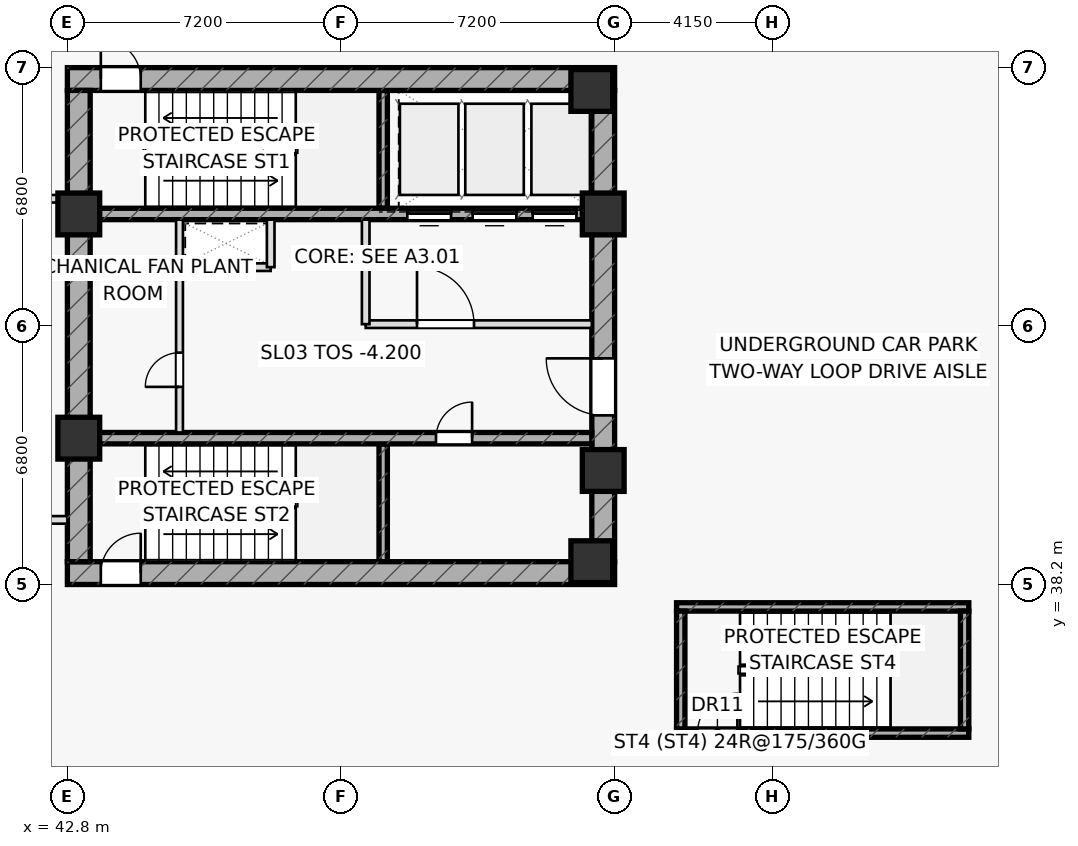
"""IFC4 building model, lengths in metres.
Left out: names, types, materials, properties, quantities, classifications, styles, units other than length and angle.
Written with IfcOpenShell. Run it as: python <this file> out.ifc"""

import sys

from ifc_helpers import new_model, si_unit, direction, frame, frame_2d, origin, origin_2d, place, context, subcontext, project, spatial, rectangle, extrude, element, fill, save


model = new_model("IFC4")
c1 = context("Model", 3, precision=1e-05, world=origin(), true_north=direction((0.0, 1.0)))
c2 = subcontext(c1, "Body", "Model", "MODEL_VIEW")
j1 = project(units=[si_unit("LENGTHUNIT", "METRE"), si_unit("PLANEANGLEUNIT", "RADIAN")], contexts=[c1])
p1 = place(None, origin())
s1 = spatial("IfcSite", under=j1, at=p1, CompositionType="ELEMENT")
p2 = place(p1, origin())
s2 = spatial("IfcBuilding", under=s1, at=p2, CompositionType="ELEMENT")
p3 = place(p2, frame((0.0, 0.0, -4.2)))
s3 = spatial("IfcBuildingStorey", under=s2, at=p3, CompositionType="ELEMENT", Elevation=-4.2)
for number, where, z_axis, x_axis in (
    (1, (51.11, 48.1, 0.0), (0.0, 0.0, 1.0), (0.0, 1.0, 0.0)),
    (2, (51.11, 38.8, 0.0), (0.0, 0.0, 1.0), (0.0, 1.0, 0.0)),
):
    element("IfcWall", number, at=place(p3, frame(where, z_axis=z_axis, x_axis=x_axis)), inside=s3, PredefinedType="SHEAR", context=c2, shape_type="SweptSolid", body=[
        extrude(rectangle(XDim=3.1, YDim=0.22, at=frame_2d((1.55, 0.0))), origin(), (0.0, 0.0, 1.0), 3.85),
    ])
p4 = place(p3, frame((58.83, 34.29, 0.0), z_axis=(0.0, 0.0, 1.0), x_axis=(1.0, 0.0, 0.0)))
e3 = element("IfcWall", 3, at=p4, inside=s3, PredefinedType="SHEAR", context=c2, shape_type="SweptSolid", body=[
    extrude(rectangle(XDim=7.69, YDim=0.22, at=frame_2d((3.845, 0.0))), origin(), (0.0, 0.0, 1.0), 3.85),
])
p5 = place(p4, frame((0.55, 0.0, 0.0)))
e4 = element("IfcOpeningElement", 4, at=p5, cuts=e3, PredefinedType="OPENING", context=c2, shape_type="SweptSolid", body=[
    extrude(rectangle(XDim=1.05, YDim=2.2, at=frame_2d((0.525, 1.1))), frame((0.0, 0.12, 0.0), z_axis=(0.0, -1.0, 0.0), x_axis=(1.0, 0.0, 0.0)), (0.0, 0.0, 1.0), 0.24),
])
p6 = place(p3, frame((58.83, 37.61, 0.0), z_axis=(0.0, 0.0, 1.0), x_axis=(1.0, 0.0, 0.0)))
e5 = element("IfcWall", 5, at=p6, inside=s3, PredefinedType="SHEAR", context=c2, shape_type="SweptSolid", body=[
    extrude(rectangle(XDim=7.69, YDim=0.22, at=frame_2d((3.845, 0.0))), origin(), (0.0, 0.0, 1.0), 3.85),
])
for number, where, z_axis, x_axis in (
    (6, (66.41, 34.4, 0.0), (0.0, 0.0, 1.0), (0.0, 1.0, 0.0)),
    (7, (58.94, 34.4, 0.0), (0.0, 0.0, 1.0), (0.0, 1.0, 0.0)),
):
    element("IfcWall", number, at=place(p3, frame(where, z_axis=z_axis, x_axis=x_axis)), inside=s3, PredefinedType="SHEAR", context=c2, shape_type="SweptSolid", body=[
        extrude(rectangle(XDim=3.1, YDim=0.22, at=frame_2d((1.55, 0.0))), origin(), (0.0, 0.0, 1.0), 3.85),
    ])
p7 = place(p3, frame((42.8, 51.5, 0.0), z_axis=(0.0, 0.0, 1.0), x_axis=(1.0, 0.0, 0.0)))
e8 = element("IfcWall", 8, at=p7, inside=s3, PredefinedType="SHEAR", context=c2, shape_type="SweptSolid", body=[
    extrude(rectangle(XDim=14.4, YDim=0.6, at=frame_2d((7.2, 0.0))), origin(), (0.0, 0.0, 1.0), 3.85),
])
p8 = place(p7, frame((0.88, 0.0, 0.0)))
e9 = element("IfcOpeningElement", 9, at=p8, cuts=e8, PredefinedType="OPENING", context=c2, shape_type="SweptSolid", body=[
    extrude(rectangle(XDim=1.05, YDim=2.2, at=frame_2d((0.525, 1.1))), frame((0.0, 0.31, 0.0), z_axis=(0.0, -1.0, 0.0), x_axis=(1.0, 0.0, 0.0)), (0.0, 0.0, 1.0), 0.62),
])
p9 = place(p3, frame((42.8, 38.5, 0.0), z_axis=(0.0, 0.0, 1.0), x_axis=(1.0, 0.0, 0.0)))
e10 = element("IfcWall", 10, at=p9, inside=s3, PredefinedType="SHEAR", context=c2, shape_type="SweptSolid", body=[
    extrude(rectangle(XDim=14.4, YDim=0.6, at=frame_2d((7.2, 0.0))), origin(), (0.0, 0.0, 1.0), 3.85),
])
p10 = place(p9, frame((0.88, 0.0, 0.0)))
e11 = element("IfcOpeningElement", 11, at=p10, cuts=e10, PredefinedType="OPENING", context=c2, shape_type="SweptSolid", body=[
    extrude(rectangle(XDim=1.05, YDim=2.2, at=frame_2d((0.525, 1.1))), frame((0.0, 0.31, 0.0), z_axis=(0.0, -1.0, 0.0), x_axis=(1.0, 0.0, 0.0)), (0.0, 0.0, 1.0), 0.62),
])
p11 = place(p3, frame((43.1, 38.8, 0.0), z_axis=(0.0, 0.0, 1.0), x_axis=(0.0, 1.0, 0.0)))
e12 = element("IfcWall", 12, at=p11, inside=s3, PredefinedType="SHEAR", context=c2, shape_type="SweptSolid", body=[
    extrude(rectangle(XDim=12.4, YDim=0.6, at=frame_2d((6.2, 0.0))), origin(), (0.0, 0.0, 1.0), 3.85),
])
p12 = place(p3, frame((56.9, 38.8, 0.0), z_axis=(0.0, 0.0, 1.0), x_axis=(0.0, 1.0, 0.0)))
e13 = element("IfcWall", 13, at=p12, inside=s3, PredefinedType="SHEAR", context=c2, shape_type="SweptSolid", body=[
    extrude(rectangle(XDim=12.4, YDim=0.6, at=frame_2d((6.2, 0.0))), origin(), (0.0, 0.0, 1.0), 3.85),
])
p13 = place(p12, frame((3.85, 0.0, 0.0)))
e14 = element("IfcOpeningElement", 14, at=p13, cuts=e13, PredefinedType="OPENING", context=c2, shape_type="SweptSolid", body=[
    extrude(rectangle(XDim=1.5, YDim=2.2, at=frame_2d((0.75, 1.1))), frame((0.0, 0.31, 0.0), z_axis=(0.0, -1.0, 0.0), x_axis=(1.0, 0.0, 0.0)), (0.0, 0.0, 1.0), 0.62),
])
p14 = place(p3, frame((43.4, 47.95, 0.0), z_axis=(0.0, 0.0, 1.0), x_axis=(1.0, 0.0, 0.0)))
e15 = element("IfcWall", 15, at=p14, inside=s3, PredefinedType="SHEAR", context=c2, shape_type="SweptSolid", body=[
    extrude(rectangle(XDim=13.2, YDim=0.3, at=frame_2d((6.6, 0.0))), origin(), (0.0, 0.0, 1.0), 3.85),
])
p15 = place(p14, frame((8.345, 0.0, 0.0)))
e16 = element("IfcOpeningElement", 16, at=p15, cuts=e15, PredefinedType="OPENING", context=c2, shape_type="SweptSolid", body=[
    extrude(rectangle(XDim=1.15, YDim=2.2, at=frame_2d((0.575, 1.1))), frame((0.0, 0.16, 0.0), z_axis=(0.0, -1.0, 0.0), x_axis=(1.0, 0.0, 0.0)), (0.0, 0.0, 1.0), 0.32),
])
p16 = place(p14, frame((10.065, 0.0, 0.0)))
e17 = element("IfcOpeningElement", 17, at=p16, cuts=e15, PredefinedType="OPENING", context=c2, shape_type="SweptSolid", body=[
    extrude(rectangle(XDim=1.15, YDim=2.2, at=frame_2d((0.575, 1.1))), frame((0.0, 0.16, 0.0), z_axis=(0.0, -1.0, 0.0), x_axis=(1.0, 0.0, 0.0)), (0.0, 0.0, 1.0), 0.32),
])
p17 = place(p14, frame((11.645, 0.0, 0.0)))
e18 = element("IfcOpeningElement", 18, at=p17, cuts=e15, PredefinedType="OPENING", context=c2, shape_type="SweptSolid", body=[
    extrude(rectangle(XDim=1.15, YDim=2.2, at=frame_2d((0.575, 1.1))), frame((0.0, 0.16, 0.0), z_axis=(0.0, -1.0, 0.0), x_axis=(1.0, 0.0, 0.0)), (0.0, 0.0, 1.0), 0.32),
])
p18 = place(p3, frame((43.4, 42.05, 0.0), z_axis=(0.0, 0.0, 1.0), x_axis=(1.0, 0.0, 0.0)))
e19 = element("IfcWall", 19, at=p18, inside=s3, PredefinedType="SHEAR", context=c2, shape_type="SweptSolid", body=[
    extrude(rectangle(XDim=13.2, YDim=0.3, at=frame_2d((6.6, 0.0))), origin(), (0.0, 0.0, 1.0), 3.85),
])
p19 = place(p18, frame((9.1, 0.0, 0.0)))
e20 = element("IfcOpeningElement", 20, at=p19, cuts=e19, PredefinedType="OPENING", context=c2, shape_type="SweptSolid", body=[
    extrude(rectangle(XDim=0.95, YDim=2.05, at=frame_2d((0.475, 1.025))), frame((0.0, 0.16, 0.0), z_axis=(0.0, -1.0, 0.0), x_axis=(1.0, 0.0, 0.0)), (0.0, 0.0, 1.0), 0.32),
])
for number, where, z_axis, x_axis in (
    (21, (43.1, 47.95, 0.0), (0.0, 0.0, 1.0), (1.0, 0.0, 0.0)),
    (22, (56.9, 47.95, 0.0), (0.0, 0.0, 1.0), (1.0, 0.0, 0.0)),
    (23, (56.6, 51.2, 0.0), (0.0, 0.0, 1.0), (1.0, 0.0, 0.0)),
    (24, (43.1, 42.05, 0.0), (0.0, 0.0, 1.0), (1.0, 0.0, 0.0)),
    (25, (56.9, 41.2, 0.0), (0.0, 0.0, 1.0), (1.0, 0.0, 0.0)),
    (26, (56.6, 38.8, 0.0), (0.0, 0.0, 1.0), (1.0, 0.0, 0.0)),
):
    element("IfcColumn", number, at=place(p3, frame(where, z_axis=z_axis, x_axis=x_axis)), inside=s3, PredefinedType="COLUMN", context=c2, shape_type="SweptSolid", body=[
        extrude(rectangle(XDim=1.1, YDim=1.1, at=origin_2d()), origin(), (0.0, 0.0, 1.0), 3.85),
    ])
for number, where, z_axis, x_axis in (
    (27, (40.3, 39.9, 0.0), (0.0, 0.0, 1.0), (1.0, 0.0, 0.0)),
    (28, (40.3, 48.35, 0.0), (0.0, 0.0, 1.0), (1.0, 0.0, 0.0)),
):
    element("IfcWall", number, at=place(p3, frame(where, z_axis=z_axis, x_axis=x_axis)), inside=s3, PredefinedType="PARTITIONING", context=c2, shape_type="SweptSolid", body=[
        extrude(rectangle(XDim=2.5, YDim=0.2, at=frame_2d((1.25, 0.0))), origin(), (0.0, 0.0, 1.0), 3.85),
    ])
p20 = place(p3, frame((45.75, 46.55, 0.0), z_axis=(0.0, 0.0, 1.0), x_axis=(1.0, 0.0, 0.0)))
e29 = element("IfcWall", 29, at=p20, inside=s3, PredefinedType="PARTITIONING", context=c2, shape_type="SweptSolid", body=[
    extrude(rectangle(XDim=2.4, YDim=0.2, at=frame_2d((1.2, 0.0))), origin(), (0.0, 0.0, 1.0), 3.85),
])
p21 = place(p3, frame((48.15, 46.55, 0.0), z_axis=(0.0, 0.0, 1.0), x_axis=(0.0, 1.0, 0.0)))
e30 = element("IfcWall", 30, at=p21, inside=s3, PredefinedType="PARTITIONING", context=c2, shape_type="SweptSolid", body=[
    extrude(rectangle(XDim=1.25, YDim=0.2, at=frame_2d((0.625, 0.0))), origin(), (0.0, 0.0, 1.0), 3.85),
])
p22 = place(p3, frame((50.65, 45.05, 0.0), z_axis=(0.0, 0.0, 1.0), x_axis=(1.0, 0.0, 0.0)))
e31 = element("IfcWall", 31, at=p22, inside=s3, PredefinedType="PARTITIONING", context=c2, shape_type="SweptSolid", body=[
    extrude(rectangle(XDim=5.95, YDim=0.2, at=frame_2d((2.975, 0.0))), origin(), (0.0, 0.0, 1.0), 3.85),
])
p23 = place(p22, frame((1.35, 0.0, 0.0)))
e32 = element("IfcOpeningElement", 32, at=p23, cuts=e31, PredefinedType="OPENING", context=c2, shape_type="SweptSolid", body=[
    extrude(rectangle(XDim=1.5, YDim=2.2, at=frame_2d((0.75, 1.1))), frame((0.0, 0.11, 0.0), z_axis=(0.0, -1.0, 0.0), x_axis=(1.0, 0.0, 0.0)), (0.0, 0.0, 1.0), 0.22),
])
p24 = place(p3, frame((50.65, 45.05, 0.0), z_axis=(0.0, 0.0, 1.0), x_axis=(0.0, 1.0, 0.0)))
e33 = element("IfcWall", 33, at=p24, inside=s3, PredefinedType="PARTITIONING", context=c2, shape_type="SweptSolid", body=[
    extrude(rectangle(XDim=2.75, YDim=0.2, at=frame_2d((1.375, 0.0))), origin(), (0.0, 0.0, 1.0), 3.85),
])
p25 = place(p3, frame((45.75, 42.2, 0.0), z_axis=(0.0, 0.0, 1.0), x_axis=(0.0, 1.0, 0.0)))
e34 = element("IfcWall", 34, at=p25, inside=s3, PredefinedType="PARTITIONING", context=c2, shape_type="SweptSolid", body=[
    extrude(rectangle(XDim=5.6, YDim=0.18, at=frame_2d((2.8, 0.0))), origin(), (0.0, 0.0, 1.0), 3.85),
])
p26 = place(p25, frame((1.2, 0.0, 0.0)))
e35 = element("IfcOpeningElement", 35, at=p26, cuts=e34, PredefinedType="OPENING", context=c2, shape_type="SweptSolid", body=[
    extrude(rectangle(XDim=0.9, YDim=2.05, at=frame_2d((0.45, 1.025))), frame((0.0, 0.1, 0.0), z_axis=(0.0, -1.0, 0.0), x_axis=(1.0, 0.0, 0.0)), (0.0, 0.0, 1.0), 0.2),
])
p27 = place(p8, origin())
e36 = element("IfcDoor", 36, at=p27, inside=s3, OperationType="SINGLE_SWING_LEFT", PredefinedType="DOOR", context=c2, shape_type="SweptSolid", body=[
    extrude(rectangle(XDim=1.05, YDim=2.2, at=frame_2d((0.525, 1.1))), frame((0.0, 0.025, 0.0), z_axis=(0.0, -1.0, 0.0), x_axis=(1.0, 0.0, 0.0)), (0.0, 0.0, 1.0), 0.05),
])
fill(e9, e36)
p28 = place(p10, origin())
e37 = element("IfcDoor", 37, at=p28, inside=s3, OperationType="SINGLE_SWING_RIGHT", PredefinedType="DOOR", context=c2, shape_type="SweptSolid", body=[
    extrude(rectangle(XDim=1.05, YDim=2.2, at=frame_2d((0.525, 1.1))), frame((0.0, 0.025, 0.0), z_axis=(0.0, -1.0, 0.0), x_axis=(1.0, 0.0, 0.0)), (0.0, 0.0, 1.0), 0.05),
])
fill(e11, e37)
p29 = place(p13, origin())
e38 = element("IfcDoor", 38, at=p29, inside=s3, OperationType="SINGLE_SWING_RIGHT", PredefinedType="DOOR", context=c2, shape_type="SweptSolid", body=[
    extrude(rectangle(XDim=1.5, YDim=2.2, at=frame_2d((0.75, 1.1))), frame((0.0, 0.025, 0.0), z_axis=(0.0, -1.0, 0.0), x_axis=(1.0, 0.0, 0.0)), (0.0, 0.0, 1.0), 0.05),
])
fill(e14, e38)
p30 = place(p23, origin())
e39 = element("IfcDoor", 39, at=p30, inside=s3, OperationType="SINGLE_SWING_LEFT", PredefinedType="DOOR", context=c2, shape_type="SweptSolid", body=[
    extrude(rectangle(XDim=1.5, YDim=2.2, at=frame_2d((0.75, 1.1))), frame((0.0, 0.025, 0.0), z_axis=(0.0, -1.0, 0.0), x_axis=(1.0, 0.0, 0.0)), (0.0, 0.0, 1.0), 0.05),
])
fill(e32, e39)
p31 = place(p5, origin())
e40 = element("IfcDoor", 40, at=p31, inside=s3, OperationType="SINGLE_SWING_RIGHT", PredefinedType="DOOR", context=c2, shape_type="SweptSolid", body=[
    extrude(rectangle(XDim=1.05, YDim=2.2, at=frame_2d((0.525, 1.1))), frame((0.0, 0.025, 0.0), z_axis=(0.0, -1.0, 0.0), x_axis=(1.0, 0.0, 0.0)), (0.0, 0.0, 1.0), 0.05),
])
fill(e4, e40)
p32 = place(p19, origin())
e41 = element("IfcDoor", 41, at=p32, inside=s3, OperationType="SINGLE_SWING_RIGHT", PredefinedType="DOOR", context=c2, shape_type="SweptSolid", body=[
    extrude(rectangle(XDim=0.95, YDim=2.05, at=frame_2d((0.475, 1.025))), frame((0.0, 0.025, 0.0), z_axis=(0.0, -1.0, 0.0), x_axis=(1.0, 0.0, 0.0)), (0.0, 0.0, 1.0), 0.05),
])
fill(e20, e41)
p33 = place(p26, origin())
e42 = element("IfcDoor", 42, at=p33, inside=s3, OperationType="SINGLE_SWING_LEFT", PredefinedType="DOOR", context=c2, shape_type="SweptSolid", body=[
    extrude(rectangle(XDim=0.9, YDim=2.05, at=frame_2d((0.45, 1.025))), frame((0.0, 0.025, 0.0), z_axis=(0.0, -1.0, 0.0), x_axis=(1.0, 0.0, 0.0)), (0.0, 0.0, 1.0), 0.05),
])
fill(e35, e42)
p34 = place(p15, origin())
e43 = element("IfcDoor", 43, at=p34, inside=s3, OperationType="SLIDING_TO_LEFT", PredefinedType="DOOR", context=c2, shape_type="SweptSolid", body=[
    extrude(rectangle(XDim=1.15, YDim=2.2, at=frame_2d((0.575, 1.1))), frame((0.0, 0.025, 0.0), z_axis=(0.0, -1.0, 0.0), x_axis=(1.0, 0.0, 0.0)), (0.0, 0.0, 1.0), 0.05),
])
fill(e16, e43)
p35 = place(p16, origin())
e44 = element("IfcDoor", 44, at=p35, inside=s3, OperationType="SLIDING_TO_LEFT", PredefinedType="DOOR", context=c2, shape_type="SweptSolid", body=[
    extrude(rectangle(XDim=1.15, YDim=2.2, at=frame_2d((0.575, 1.1))), frame((0.0, 0.025, 0.0), z_axis=(0.0, -1.0, 0.0), x_axis=(1.0, 0.0, 0.0)), (0.0, 0.0, 1.0), 0.05),
])
fill(e17, e44)
p36 = place(p17, origin())
e45 = element("IfcDoor", 45, at=p36, inside=s3, OperationType="SLIDING_TO_LEFT", PredefinedType="DOOR", context=c2, shape_type="SweptSolid", body=[
    extrude(rectangle(XDim=1.15, YDim=2.2, at=frame_2d((0.575, 1.1))), frame((0.0, 0.025, 0.0), z_axis=(0.0, -1.0, 0.0), x_axis=(1.0, 0.0, 0.0)), (0.0, 0.0, 1.0), 0.05),
])
fill(e18, e45)
save(model, sys.argv[1])
